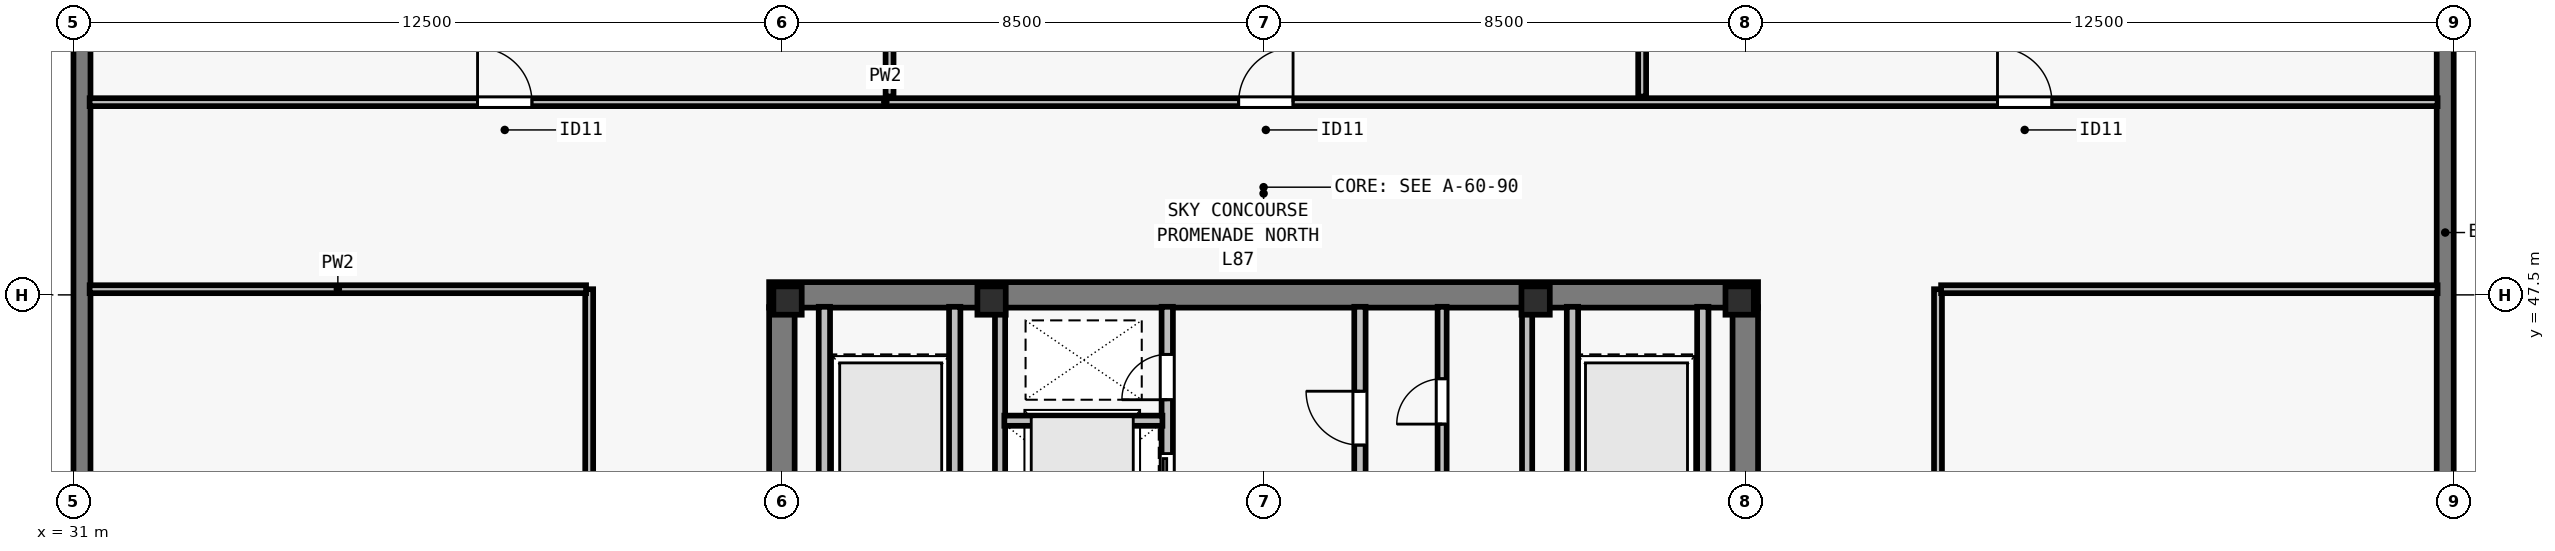
"""IFC4 building model, lengths in metres.
Left out: names, types, materials, properties, quantities, classifications, styles, units other than length and angle.
Written with IfcOpenShell. Run it as: python <this file> out.ifc"""

import sys

from ifc_helpers import new_model, si_unit, direction, frame, frame_2d, origin, origin_2d, place, context, subcontext, project, spatial, rectangle, i_section, extrude, element, fill, save


model = new_model("IFC4")
c1 = context("Model", 3, precision=1e-05, world=origin(), true_north=direction((0.0, 1.0)))
c2 = subcontext(c1, "Body", "Model", "MODEL_VIEW")
j1 = project(units=[si_unit("LENGTHUNIT", "METRE"), si_unit("PLANEANGLEUNIT", "RADIAN")], contexts=[c1])
p1 = place(None, origin())
s1 = spatial("IfcSite", under=j1, at=p1, CompositionType="ELEMENT")
p2 = place(p1, origin())
s2 = spatial("IfcBuilding", under=s1, at=p2, CompositionType="ELEMENT")
p3 = place(p2, frame((0.0, 0.0, 315.5)))
s3 = spatial("IfcBuildingStorey", under=s2, at=p3, CompositionType="ELEMENT", Elevation=315.5)
for number, where, z_axis, x_axis in (
    (1, (43.6, 47.4, 0.0), (0.0, 0.0, 1.0), (1.0, 0.0, 0.0)),
    (2, (47.2, 47.4, 0.0), (0.0, 0.0, 1.0), (1.0, 0.0, 0.0)),
    (3, (56.8, 47.4, 0.0), (0.0, 0.0, 1.0), (1.0, 0.0, 0.0)),
    (4, (60.4, 47.4, 0.0), (0.0, 0.0, 1.0), (1.0, 0.0, 0.0)),
):
    element("IfcColumn", number, at=place(p3, frame(where, z_axis=z_axis, x_axis=x_axis)), inside=s3, PredefinedType="COLUMN", context=c2, shape_type="SweptSolid", body=[
        extrude(i_section(OverallWidth=0.5, OverallDepth=0.5, WebThickness=0.028, FlangeThickness=0.045, at=origin_2d()), origin(), (0.0, 0.0, 1.0), 4.5),
    ])
p4 = place(p3, frame((72.85, 54.5, 0.0), z_axis=(0.0, 0.0, 1.0), x_axis=(0.0, -1.0, 0.0)))
e5 = element("IfcWall", 5, at=p4, inside=s3, PredefinedType="SOLIDWALL", context=c2, shape_type="SweptSolid", body=[
    extrude(rectangle(XDim=11.8, YDim=0.3, at=frame_2d((5.9, 0.0))), origin(), (0.0, 0.0, 1.0), 4.29),
])
p5 = place(p3, frame((31.15, 42.7, 0.0), z_axis=(0.0, 0.0, 1.0), x_axis=(0.0, 1.0, 0.0)))
e6 = element("IfcWall", 6, at=p5, inside=s3, PredefinedType="SOLIDWALL", context=c2, shape_type="SweptSolid", body=[
    extrude(rectangle(XDim=11.522, YDim=0.3, at=frame_2d((5.761, 0.0))), origin(), (0.0, 0.0, 1.0), 4.29),
])
p6 = place(p3, frame((43.275, 47.5, 0.0), z_axis=(0.0, 0.0, 1.0), x_axis=(1.0, 0.0, 0.0)))
e7 = element("IfcWall", 7, at=p6, inside=s3, PredefinedType="SHEAR", context=c2, shape_type="SweptSolid", body=[
    extrude(rectangle(XDim=17.45, YDim=0.45, at=frame_2d((8.725, 0.0))), origin(), (0.0, 0.0, 1.0), 4.29),
])
for number, where, z_axis, x_axis in (
    (8, (43.5, 40.8, 0.0), (0.0, 0.0, 1.0), (0.0, 1.0, 0.0)),
    (9, (60.5, 40.8, 0.0), (0.0, 0.0, 1.0), (0.0, 1.0, 0.0)),
):
    element("IfcWall", number, at=place(p3, frame(where, z_axis=z_axis, x_axis=x_axis)), inside=s3, PredefinedType="SHEAR", context=c2, shape_type="SweptSolid", body=[
        extrude(rectangle(XDim=6.485, YDim=0.45, at=frame_2d((3.242, 0.0))), origin(), (0.0, 0.0, 1.0), 4.29),
    ])
p7 = place(p3, frame((50.3, 40.585, 0.0), z_axis=(0.0, 0.0, 1.0), x_axis=(0.0, 1.0, 0.0)))
e10 = element("IfcWall", 10, at=p7, inside=s3, PredefinedType="SOLIDWALL", context=c2, shape_type="SweptSolid", body=[
    extrude(rectangle(XDim=6.705, YDim=0.2, at=frame_2d((3.353, 0.0))), origin(), (0.0, 0.0, 1.0), 4.29),
])
p8 = place(p7, frame((0.515, 0.0, 0.0)))
e11 = element("IfcOpeningElement", 11, at=p8, cuts=e10, PredefinedType="OPENING", context=c2, shape_type="SweptSolid", body=[
    extrude(rectangle(XDim=1.1, YDim=2.2, at=frame_2d((0.55, 1.1))), frame((0.0, 0.11, 0.0), z_axis=(0.0, -1.0, 0.0), x_axis=(1.0, 0.0, 0.0)), (0.0, 0.0, 1.0), 0.22),
])
p9 = place(p7, frame((3.015, 0.0, 0.0)))
e12 = element("IfcOpeningElement", 12, at=p9, cuts=e10, PredefinedType="OPENING", context=c2, shape_type="SweptSolid", body=[
    extrude(rectangle(XDim=1.1, YDim=2.2, at=frame_2d((0.55, 1.1))), frame((0.0, 0.11, 0.0), z_axis=(0.0, -1.0, 0.0), x_axis=(1.0, 0.0, 0.0)), (0.0, 0.0, 1.0), 0.22),
])
p10 = place(p7, frame((5.065, 0.0, 0.0)))
e13 = element("IfcOpeningElement", 13, at=p10, cuts=e10, PredefinedType="OPENING", context=c2, shape_type="SweptSolid", body=[
    extrude(rectangle(XDim=0.8, YDim=2.08, at=frame_2d((0.4, 1.04))), frame((0.0, 0.11, 0.0), z_axis=(0.0, -1.0, 0.0), x_axis=(1.0, 0.0, 0.0)), (0.0, 0.0, 1.0), 0.22),
])
p11 = place(p3, frame((53.7, 40.585, 0.0), z_axis=(0.0, 0.0, 1.0), x_axis=(0.0, 1.0, 0.0)))
e14 = element("IfcWall", 14, at=p11, inside=s3, PredefinedType="SOLIDWALL", context=c2, shape_type="SweptSolid", body=[
    extrude(rectangle(XDim=6.705, YDim=0.2, at=frame_2d((3.353, 0.0))), origin(), (0.0, 0.0, 1.0), 4.29),
])
p12 = place(p11, frame((0.195, 0.0, 0.0)))
e15 = element("IfcOpeningElement", 15, at=p12, cuts=e14, PredefinedType="OPENING", context=c2, shape_type="SweptSolid", body=[
    extrude(rectangle(XDim=0.8, YDim=2.08, at=frame_2d((0.4, 1.04))), frame((0.0, 0.11, 0.0), z_axis=(0.0, -1.0, 0.0), x_axis=(1.0, 0.0, 0.0)), (0.0, 0.0, 1.0), 0.22),
])
p13 = place(p11, frame((1.865, 0.0, 0.0)))
e16 = element("IfcOpeningElement", 16, at=p13, cuts=e14, PredefinedType="OPENING", context=c2, shape_type="SweptSolid", body=[
    extrude(rectangle(XDim=1.1, YDim=2.2, at=frame_2d((0.55, 1.1))), frame((0.0, 0.11, 0.0), z_axis=(0.0, -1.0, 0.0), x_axis=(1.0, 0.0, 0.0)), (0.0, 0.0, 1.0), 0.22),
])
p14 = place(p11, frame((4.265, 0.0, 0.0)))
e17 = element("IfcOpeningElement", 17, at=p14, cuts=e14, PredefinedType="OPENING", context=c2, shape_type="SweptSolid", body=[
    extrude(rectangle(XDim=0.95, YDim=2.12, at=frame_2d((0.475, 1.06))), frame((0.0, 0.11, 0.0), z_axis=(0.0, -1.0, 0.0), x_axis=(1.0, 0.0, 0.0)), (0.0, 0.0, 1.0), 0.22),
])
for number, where, z_axis, x_axis in (
    (18, (46.55, 43.735, 0.0), (0.0, 0.0, 1.0), (0.0, 1.0, 0.0)),
    (19, (44.25, 43.735, 0.0), (0.0, 0.0, 1.0), (0.0, 1.0, 0.0)),
    (20, (57.45, 43.735, 0.0), (0.0, 0.0, 1.0), (0.0, 1.0, 0.0)),
    (21, (59.75, 43.735, 0.0), (0.0, 0.0, 1.0), (0.0, 1.0, 0.0)),
):
    element("IfcWall", number, at=place(p3, frame(where, z_axis=z_axis, x_axis=x_axis)), inside=s3, PredefinedType="SOLIDWALL", context=c2, shape_type="SweptSolid", body=[
        extrude(rectangle(XDim=3.555, YDim=0.2, at=frame_2d((1.777, 0.0))), origin(), (0.0, 0.0, 1.0), 4.29),
    ])
p15 = place(p3, frame((47.35, 43.735, 0.0), z_axis=(0.0, 0.0, 1.0), x_axis=(0.0, 1.0, 0.0)))
e22 = element("IfcWall", 22, at=p15, inside=s3, PredefinedType="SOLIDWALL", context=c2, shape_type="SweptSolid", body=[
    extrude(rectangle(XDim=3.555, YDim=0.18, at=frame_2d((1.777, 0.0))), origin(), (0.0, 0.0, 1.0), 4.29),
])
p16 = place(p3, frame((47.425, 45.28, 0.0), z_axis=(0.0, 0.0, 1.0), x_axis=(1.0, 0.0, 0.0)))
e23 = element("IfcWall", 23, at=p16, inside=s3, PredefinedType="SOLIDWALL", context=c2, shape_type="SweptSolid", body=[
    extrude(rectangle(XDim=2.79, YDim=0.18, at=frame_2d((1.395, 0.0))), origin(), (0.0, 0.0, 1.0), 4.29),
])
p17 = place(p3, frame((56.65, 43.735, 0.0), z_axis=(0.0, 0.0, 1.0), x_axis=(0.0, 1.0, 0.0)))
e24 = element("IfcWall", 24, at=p17, inside=s3, PredefinedType="SOLIDWALL", context=c2, shape_type="SweptSolid", body=[
    extrude(rectangle(XDim=3.555, YDim=0.18, at=frame_2d((1.777, 0.0))), origin(), (0.0, 0.0, 1.0), 4.29),
])
p18 = place(p3, frame((55.15, 44.195, 0.0), z_axis=(0.0, 0.0, 1.0), x_axis=(0.0, 1.0, 0.0)))
e25 = element("IfcWall", 25, at=p18, inside=s3, PredefinedType="PARTITIONING", context=c2, shape_type="SweptSolid", body=[
    extrude(rectangle(XDim=3.095, YDim=0.16, at=frame_2d((1.547, 0.0))), origin(), (0.0, 0.0, 1.0), 4.29),
])
p19 = place(p18, frame((1.025, 0.0, 0.0)))
e26 = element("IfcOpeningElement", 26, at=p19, cuts=e25, PredefinedType="OPENING", context=c2, shape_type="SweptSolid", body=[
    extrude(rectangle(XDim=0.8, YDim=2.1, at=frame_2d((0.4, 1.05))), frame((0.0, 0.09, 0.0), z_axis=(0.0, -1.0, 0.0), x_axis=(1.0, 0.0, 0.0)), (0.0, 0.0, 1.0), 0.18),
])
p20 = place(p3, frame((31.285, 50.9, 0.0), z_axis=(0.0, 0.0, 1.0), x_axis=(1.0, 0.0, 0.0)))
e27 = element("IfcWall", 27, at=p20, inside=s3, PredefinedType="PARTITIONING", context=c2, shape_type="SweptSolid", body=[
    extrude(rectangle(XDim=41.43, YDim=0.14, at=frame_2d((20.715, 0.0))), origin(), (0.0, 0.0, 1.0), 4.009),
])
p21 = place(p20, frame((6.845, 0.0, 0.0)))
e28 = element("IfcOpeningElement", 28, at=p21, cuts=e27, PredefinedType="OPENING", context=c2, shape_type="SweptSolid", body=[
    extrude(rectangle(XDim=0.96, YDim=2.12, at=frame_2d((0.48, 1.06))), frame((0.0, 0.08, 0.0), z_axis=(0.0, -1.0, 0.0), x_axis=(1.0, 0.0, 0.0)), (0.0, 0.0, 1.0), 0.16),
])
p22 = place(p20, frame((20.275, 0.0, 0.0)))
e29 = element("IfcOpeningElement", 29, at=p22, cuts=e27, PredefinedType="OPENING", context=c2, shape_type="SweptSolid", body=[
    extrude(rectangle(XDim=0.96, YDim=2.12, at=frame_2d((0.48, 1.06))), frame((0.0, 0.08, 0.0), z_axis=(0.0, -1.0, 0.0), x_axis=(1.0, 0.0, 0.0)), (0.0, 0.0, 1.0), 0.16),
])
p23 = place(p20, frame((33.665, 0.0, 0.0)))
e30 = element("IfcOpeningElement", 30, at=p23, cuts=e27, PredefinedType="OPENING", context=c2, shape_type="SweptSolid", body=[
    extrude(rectangle(XDim=0.96, YDim=2.12, at=frame_2d((0.48, 1.06))), frame((0.0, 0.08, 0.0), z_axis=(0.0, -1.0, 0.0), x_axis=(1.0, 0.0, 0.0)), (0.0, 0.0, 1.0), 0.16),
])
p24 = place(p3, frame((40.1, 30.4, 0.0), z_axis=(0.0, 0.0, 1.0), x_axis=(0.0, 1.0, 0.0)))
e31 = element("IfcWall", 31, at=p24, inside=s3, PredefinedType="PARTITIONING", context=c2, shape_type="SweptSolid", body=[
    extrude(rectangle(XDim=17.2, YDim=0.14, at=frame_2d((8.6, 0.0))), origin(), (0.0, 0.0, 1.0), 4.009),
])
p25 = place(p24, frame((3.772, 0.0, 0.0)))
e32 = element("IfcOpeningElement", 32, at=p25, cuts=e31, PredefinedType="OPENING", context=c2, shape_type="SweptSolid", body=[
    extrude(rectangle(XDim=0.96, YDim=2.12, at=frame_2d((0.48, 1.06))), frame((0.0, 0.08, 0.0), z_axis=(0.0, -1.0, 0.0), x_axis=(1.0, 0.0, 0.0)), (0.0, 0.0, 1.0), 0.16),
])
p26 = place(p24, frame((12.272, 0.0, 0.0)))
e33 = element("IfcOpeningElement", 33, at=p26, cuts=e31, PredefinedType="OPENING", context=c2, shape_type="SweptSolid", body=[
    extrude(rectangle(XDim=0.96, YDim=2.12, at=frame_2d((0.48, 1.06))), frame((0.0, 0.08, 0.0), z_axis=(0.0, -1.0, 0.0), x_axis=(1.0, 0.0, 0.0)), (0.0, 0.0, 1.0), 0.16),
])
p27 = place(p3, frame((63.9, 30.4, 0.0), z_axis=(0.0, 0.0, 1.0), x_axis=(0.0, 1.0, 0.0)))
e34 = element("IfcWall", 34, at=p27, inside=s3, PredefinedType="PARTITIONING", context=c2, shape_type="SweptSolid", body=[
    extrude(rectangle(XDim=17.2, YDim=0.14, at=frame_2d((8.6, 0.0))), origin(), (0.0, 0.0, 1.0), 4.29),
])
p28 = place(p27, frame((3.968, 0.0, 0.0)))
e35 = element("IfcOpeningElement", 35, at=p28, cuts=e34, PredefinedType="OPENING", context=c2, shape_type="SweptSolid", body=[
    extrude(rectangle(XDim=0.96, YDim=2.12, at=frame_2d((0.48, 1.06))), frame((0.0, 0.08, 0.0), z_axis=(0.0, -1.0, 0.0), x_axis=(1.0, 0.0, 0.0)), (0.0, 0.0, 1.0), 0.16),
])
p29 = place(p27, frame((12.468, 0.0, 0.0)))
e36 = element("IfcOpeningElement", 36, at=p29, cuts=e34, PredefinedType="OPENING", context=c2, shape_type="SweptSolid", body=[
    extrude(rectangle(XDim=0.96, YDim=2.12, at=frame_2d((0.48, 1.06))), frame((0.0, 0.08, 0.0), z_axis=(0.0, -1.0, 0.0), x_axis=(1.0, 0.0, 0.0)), (0.0, 0.0, 1.0), 0.16),
])
for number, where, z_axis, x_axis in (
    (37, (31.285, 47.6, 0.0), (0.0, 0.0, 1.0), (1.0, 0.0, 0.0)),
    (38, (63.955, 47.6, 0.0), (0.0, 0.0, 1.0), (1.0, 0.0, 0.0)),
):
    element("IfcWall", number, at=place(p3, frame(where, z_axis=z_axis, x_axis=x_axis)), inside=s3, PredefinedType="PARTITIONING", context=c2, shape_type="SweptSolid", body=[
        extrude(rectangle(XDim=8.76, YDim=0.14, at=frame_2d((4.38, 0.0))), origin(), (0.0, 0.0, 1.0), 4.29),
    ])
p30 = place(p3, frame((45.4, 51.0, 0.0), z_axis=(0.0, 0.0, 1.0), x_axis=(0.0, 1.0, 0.0)))
e39 = element("IfcWall", 39, at=p30, inside=s3, PredefinedType="PARTITIONING", context=c2, shape_type="SweptSolid", body=[
    extrude(rectangle(XDim=8.715, YDim=0.14, at=frame_2d((4.357, 0.0))), origin(), (0.0, 0.0, 1.0), 4.29),
])
p31 = place(p3, frame((58.68, 51.0, 0.0), z_axis=(0.0, 0.0, 1.0), x_axis=(0.0, 1.0, 0.0)))
e40 = element("IfcWall", 40, at=p31, inside=s3, PredefinedType="PARTITIONING", context=c2, shape_type="SweptSolid", body=[
    extrude(rectangle(XDim=8.585, YDim=0.14, at=frame_2d((4.292, 0.0))), origin(), (0.0, 0.0, 1.0), 4.29),
])
p32 = place(p9, origin())
e41 = element("IfcDoor", 41, at=p32, inside=s3, OperationType="SLIDING_TO_LEFT", PredefinedType="DOOR", context=c2, shape_type="SweptSolid", body=[
    extrude(rectangle(XDim=1.1, YDim=2.2, at=frame_2d((0.55, 1.1))), frame((0.0, 0.025, 0.0), z_axis=(0.0, -1.0, 0.0), x_axis=(1.0, 0.0, 0.0)), (0.0, 0.0, 1.0), 0.05),
])
fill(e12, e41)
p33 = place(p10, origin())
e42 = element("IfcDoor", 42, at=p33, inside=s3, OperationType="SINGLE_SWING_LEFT", PredefinedType="DOOR", context=c2, shape_type="SweptSolid", body=[
    extrude(rectangle(XDim=0.8, YDim=2.08, at=frame_2d((0.4, 1.04))), frame((0.0, 0.025, 0.0), z_axis=(0.0, -1.0, 0.0), x_axis=(1.0, 0.0, 0.0)), (0.0, 0.0, 1.0), 0.05),
])
fill(e13, e42)
p34 = place(p14, origin())
e43 = element("IfcDoor", 43, at=p34, inside=s3, OperationType="SINGLE_SWING_RIGHT", PredefinedType="DOOR", context=c2, shape_type="SweptSolid", body=[
    extrude(rectangle(XDim=0.95, YDim=2.12, at=frame_2d((0.475, 1.06))), frame((0.0, 0.025, 0.0), z_axis=(0.0, -1.0, 0.0), x_axis=(1.0, 0.0, 0.0)), (0.0, 0.0, 1.0), 0.05),
])
fill(e17, e43)
p35 = place(p19, origin())
e44 = element("IfcDoor", 44, at=p35, inside=s3, OperationType="SINGLE_SWING_LEFT", PredefinedType="DOOR", context=c2, shape_type="SweptSolid", body=[
    extrude(rectangle(XDim=0.8, YDim=2.1, at=frame_2d((0.4, 1.05))), frame((0.0, 0.025, 0.0), z_axis=(0.0, -1.0, 0.0), x_axis=(1.0, 0.0, 0.0)), (0.0, 0.0, 1.0), 0.05),
])
fill(e26, e44)
p36 = place(p21, origin())
e45 = element("IfcDoor", 45, at=p36, inside=s3, OperationType="SINGLE_SWING_LEFT", PredefinedType="DOOR", context=c2, shape_type="SweptSolid", body=[
    extrude(rectangle(XDim=0.96, YDim=2.12, at=frame_2d((0.48, 1.06))), frame((0.0, 0.025, 0.0), z_axis=(0.0, -1.0, 0.0), x_axis=(1.0, 0.0, 0.0)), (0.0, 0.0, 1.0), 0.05),
])
fill(e28, e45)
p37 = place(p22, origin())
e46 = element("IfcDoor", 46, at=p37, inside=s3, OperationType="SINGLE_SWING_RIGHT", PredefinedType="DOOR", context=c2, shape_type="SweptSolid", body=[
    extrude(rectangle(XDim=0.96, YDim=2.12, at=frame_2d((0.48, 1.06))), frame((0.0, 0.025, 0.0), z_axis=(0.0, -1.0, 0.0), x_axis=(1.0, 0.0, 0.0)), (0.0, 0.0, 1.0), 0.05),
])
fill(e29, e46)
p38 = place(p23, origin())
e47 = element("IfcDoor", 47, at=p38, inside=s3, OperationType="SINGLE_SWING_LEFT", PredefinedType="DOOR", context=c2, shape_type="SweptSolid", body=[
    extrude(rectangle(XDim=0.96, YDim=2.12, at=frame_2d((0.48, 1.06))), frame((0.0, 0.025, 0.0), z_axis=(0.0, -1.0, 0.0), x_axis=(1.0, 0.0, 0.0)), (0.0, 0.0, 1.0), 0.05),
])
fill(e30, e47)
save(model, sys.argv[1])
